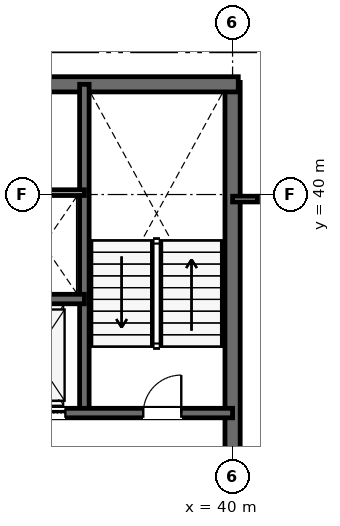
"""IFC4 building model, lengths in metres.
Left out: names, types, materials, properties, quantities, classifications, styles, units other than length and angle.
Written with IfcOpenShell. Run it as: python <this file> out.ifc"""

import sys

from ifc_helpers import new_model, si_unit, direction, frame, frame_2d, origin, place, context, subcontext, project, spatial, rectangle, extrude, element, fill, save


model = new_model("IFC4")
c1 = context("Model", 3, precision=1e-05, world=origin(), true_north=direction((0.0, 1.0)))
c2 = subcontext(c1, "Body", "Model", "MODEL_VIEW")
j1 = project(units=[si_unit("LENGTHUNIT", "METRE"), si_unit("PLANEANGLEUNIT", "RADIAN")], contexts=[c1])
p1 = place(None, origin())
s1 = spatial("IfcSite", under=j1, at=p1, CompositionType="ELEMENT")
p2 = place(p1, origin())
s2 = spatial("IfcBuilding", under=s1, at=p2, CompositionType="ELEMENT")
p3 = place(p2, origin())
s3 = spatial("IfcBuildingStorey", under=s2, at=p3, CompositionType="ELEMENT", Elevation=0.0)
p4 = place(p3, frame((40.0, 30.65, 0.0), z_axis=(0.0, 0.0, 1.0), x_axis=(0.0, 1.0, 0.0)))
e1 = element("IfcWall", 1, at=p4, inside=s3, PredefinedType="SHEAR", context=c2, shape_type="SweptSolid", body=[
    extrude(rectangle(XDim=12.3, YDim=0.4, at=frame_2d((6.15, 0.0))), origin(), (0.0, 0.0, 1.0), 6.0),
])
p5 = place(p3, frame((15.85, 42.9, 0.0), z_axis=(0.0, 0.0, 1.0), x_axis=(1.0, 0.0, 0.0)))
e2 = element("IfcWall", 2, at=p5, inside=s3, PredefinedType="SHEAR", context=c2, shape_type="SweptSolid", body=[
    extrude(rectangle(XDim=24.3, YDim=0.4, at=frame_2d((12.15, 0.0))), origin(), (0.0, 0.0, 1.0), 6.0),
])
p6 = place(p3, frame((36.1, 34.25, 0.0), z_axis=(0.0, 0.0, 1.0), x_axis=(0.0, 1.0, 0.0)))
e3 = element("IfcWall", 3, at=p6, inside=s3, PredefinedType="SHEAR", context=c2, shape_type="SweptSolid", body=[
    extrude(rectangle(XDim=8.65, YDim=0.25, at=frame_2d((4.325, 0.0))), origin(), (0.0, 0.0, 1.0), 6.0),
])
p7 = place(p3, frame((33.95, 34.25, 0.0), z_axis=(0.0, 0.0, 1.0), x_axis=(1.0, 0.0, 0.0)))
e4 = element("IfcWall", 4, at=p7, inside=s3, PredefinedType="SHEAR", context=c2, shape_type="SweptSolid", body=[
    extrude(rectangle(XDim=6.05, YDim=0.25, at=frame_2d((3.025, 0.0))), origin(), (0.0, 0.0, 1.0), 6.0),
])
p8 = place(p7, frame((3.7, 0.0, 0.0)))
e5 = element("IfcOpeningElement", 5, at=p8, cuts=e4, PredefinedType="OPENING", context=c2, shape_type="SweptSolid", body=[
    extrude(rectangle(XDim=1.0, YDim=2.15, at=frame_2d((0.5, 1.075))), frame((0.0, 0.135, 0.0), z_axis=(0.0, -1.0, 0.0), x_axis=(1.0, 0.0, 0.0)), (0.0, 0.0, 1.0), 0.27),
])
p9 = place(p7, frame((0.55, 0.0, 0.0)))
e6 = element("IfcOpeningElement", 6, at=p9, cuts=e4, PredefinedType="OPENING", context=c2, shape_type="SweptSolid", body=[
    extrude(rectangle(XDim=1.1, YDim=2.15, at=frame_2d((0.55, 1.075))), frame((0.0, 0.135, 0.0), z_axis=(0.0, -1.0, 0.0), x_axis=(1.0, 0.0, 0.0)), (0.0, 0.0, 1.0), 0.27),
])
p10 = place(p3, frame((19.9, 37.25, 0.0), z_axis=(0.0, 0.0, 1.0), x_axis=(1.0, 0.0, 0.0)))
e7 = element("IfcWall", 7, at=p10, inside=s3, PredefinedType="SHEAR", context=c2, shape_type="SweptSolid", body=[
    extrude(rectangle(XDim=16.2, YDim=0.25, at=frame_2d((8.1, 0.0))), origin(), (0.0, 0.0, 1.0), 6.0),
])
p11 = place(p10, frame((12.55, 0.0, 0.0)))
e8 = element("IfcOpeningElement", 8, at=p11, cuts=e7, PredefinedType="OPENING", context=c2, shape_type="SweptSolid", body=[
    extrude(rectangle(XDim=0.9, YDim=2.15, at=frame_2d((0.45, 1.075))), frame((0.0, 0.135, 0.0), z_axis=(0.0, -1.0, 0.0), x_axis=(1.0, 0.0, 0.0)), (0.0, 0.0, 1.0), 0.27),
])
p12 = place(p10, frame((2.5, 0.0, 0.0)))
e9 = element("IfcOpeningElement", 9, at=p12, cuts=e7, PredefinedType="OPENING", context=c2, shape_type="SweptSolid", body=[
    extrude(rectangle(XDim=1.05, YDim=2.15, at=frame_2d((0.525, 1.075))), frame((0.0, 0.135, 0.0), z_axis=(0.0, -1.0, 0.0), x_axis=(1.0, 0.0, 0.0)), (0.0, 0.0, 1.0), 0.27),
])
p13 = place(p10, frame((4.4, 0.0, 0.0)))
e10 = element("IfcOpeningElement", 10, at=p13, cuts=e7, PredefinedType="OPENING", context=c2, shape_type="SweptSolid", body=[
    extrude(rectangle(XDim=1.05, YDim=2.15, at=frame_2d((0.525, 1.075))), frame((0.0, 0.135, 0.0), z_axis=(0.0, -1.0, 0.0), x_axis=(1.0, 0.0, 0.0)), (0.0, 0.0, 1.0), 0.27),
])
p14 = place(p10, frame((6.3, 0.0, 0.0)))
e11 = element("IfcOpeningElement", 11, at=p14, cuts=e7, PredefinedType="OPENING", context=c2, shape_type="SweptSolid", body=[
    extrude(rectangle(XDim=1.05, YDim=2.15, at=frame_2d((0.525, 1.075))), frame((0.0, 0.135, 0.0), z_axis=(0.0, -1.0, 0.0), x_axis=(1.0, 0.0, 0.0)), (0.0, 0.0, 1.0), 0.27),
])
p15 = place(p10, frame((8.3, 0.0, 0.0)))
e12 = element("IfcOpeningElement", 12, at=p15, cuts=e7, PredefinedType="OPENING", context=c2, shape_type="SweptSolid", body=[
    extrude(rectangle(XDim=1.1, YDim=2.15, at=frame_2d((0.55, 1.075))), frame((0.0, 0.135, 0.0), z_axis=(0.0, -1.0, 0.0), x_axis=(1.0, 0.0, 0.0)), (0.0, 0.0, 1.0), 0.27),
])
p16 = place(p10, frame((10.4, 0.0, 0.0)))
e13 = element("IfcOpeningElement", 13, at=p16, cuts=e7, PredefinedType="OPENING", context=c2, shape_type="SweptSolid", body=[
    extrude(rectangle(XDim=1.1, YDim=2.15, at=frame_2d((0.55, 1.075))), frame((0.0, 0.135, 0.0), z_axis=(0.0, -1.0, 0.0), x_axis=(1.0, 0.0, 0.0)), (0.0, 0.0, 1.0), 0.27),
])
p17 = place(p3, frame((34.05, 40.05, 0.0), z_axis=(0.0, 0.0, 1.0), x_axis=(1.0, 0.0, 0.0)))
e14 = element("IfcWall", 14, at=p17, inside=s3, PredefinedType="PARTITIONING", context=c2, shape_type="SweptSolid", body=[
    extrude(rectangle(XDim=2.05, YDim=0.15, at=frame_2d((1.025, 0.0))), origin(), (0.0, 0.0, 1.0), 5.67),
])
p18 = place(p3, frame((40.0, 39.88, 0.0), z_axis=(0.0, 0.0, 1.0), x_axis=(1.0, 0.0, 0.0)))
e15 = element("IfcWall", 15, at=p18, inside=s3, PredefinedType="PARTITIONING", context=c2, shape_type="SweptSolid", body=[
    extrude(rectangle(XDim=0.655, YDim=0.15, at=frame_2d((0.328, 0.0))), origin(), (0.0, 0.0, 1.0), 5.67),
])
p19 = place(p8, origin())
e16 = element("IfcDoor", 16, at=p19, inside=s3, OperationType="SINGLE_SWING_RIGHT", PredefinedType="DOOR", context=c2, shape_type="SweptSolid", body=[
    extrude(rectangle(XDim=1.0, YDim=2.15, at=frame_2d((0.5, 1.075))), frame((0.0, 0.025, 0.0), z_axis=(0.0, -1.0, 0.0), x_axis=(1.0, 0.0, 0.0)), (0.0, 0.0, 1.0), 0.05),
])
fill(e5, e16)
p20 = place(p9, origin())
e17 = element("IfcDoor", 17, at=p20, inside=s3, OperationType="DOUBLE_DOOR_SLIDING", PredefinedType="DOOR", context=c2, shape_type="SweptSolid", body=[
    extrude(rectangle(XDim=1.1, YDim=2.15, at=frame_2d((0.55, 1.075))), frame((0.0, 0.025, 0.0), z_axis=(0.0, -1.0, 0.0), x_axis=(1.0, 0.0, 0.0)), (0.0, 0.0, 1.0), 0.05),
])
fill(e6, e17)
save(model, sys.argv[1])
